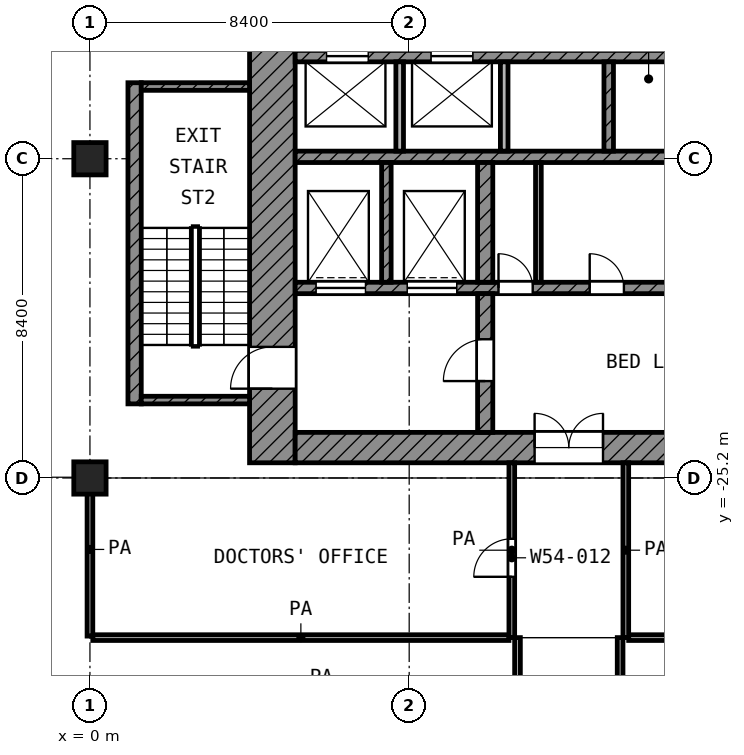
"""IFC4 building model, lengths in metres.
Left out: names, types, materials, properties, quantities, classifications, styles, units other than length and angle.
Written with IfcOpenShell. Run it as: python <this file> out.ifc"""

import sys

from ifc_helpers import new_model, si_unit, direction, frame, frame_2d, origin, origin_2d, place, context, subcontext, project, spatial, rectangle, extrude, element, fill, save


model = new_model("IFC4")
c1 = context("Model", 3, precision=1e-05, world=origin(), true_north=direction((0.0, 1.0)))
c2 = subcontext(c1, "Body", "Model", "MODEL_VIEW")
j1 = project(units=[si_unit("LENGTHUNIT", "METRE"), si_unit("PLANEANGLEUNIT", "RADIAN")], contexts=[c1])
p1 = place(None, origin())
s1 = spatial("IfcSite", under=j1, at=p1, CompositionType="ELEMENT")
p2 = place(p1, origin())
s2 = spatial("IfcBuilding", under=s1, at=p2, CompositionType="ELEMENT")
p3 = place(p2, frame((0.0, 0.0, 255.8)))
s3 = spatial("IfcBuildingStorey", under=s2, at=p3, CompositionType="ELEMENT", Elevation=255.8)
for number, where, z_axis, x_axis in (
    (1, (0.0, -16.8, 0.0), (0.0, 0.0, 1.0), (1.0, 0.0, 0.0)),
    (2, (0.0, -25.2, 0.0), (0.0, 0.0, 1.0), (1.0, 0.0, 0.0)),
):
    element("IfcColumn", number, at=place(p3, frame(where, z_axis=z_axis, x_axis=x_axis)), inside=s3, PredefinedType="COLUMN", context=c2, shape_type="SweptSolid", body=[
        extrude(rectangle(XDim=0.85, YDim=0.85, at=origin_2d()), origin(), (0.0, 0.0, 1.0), 4.2),
    ])
p4 = place(p3, frame((4.8, -24.8, 0.0), z_axis=(0.0, 0.0, 1.0), x_axis=(0.0, 1.0, 0.0)))
e3 = element("IfcWall", 3, at=p4, inside=s3, PredefinedType="SHEAR", context=c2, shape_type="SweptSolid", body=[
    extrude(rectangle(XDim=19.4, YDim=1.2, at=frame_2d((9.7, 0.0))), origin(), (0.0, 0.0, 1.0), 3.6),
])
p5 = place(p4, frame((11.25, 0.0, 0.0)))
e4 = element("IfcOpeningElement", 4, at=p5, cuts=e3, PredefinedType="OPENING", context=c2, shape_type="SweptSolid", body=[
    extrude(rectangle(XDim=1.1, YDim=2.1, at=frame_2d((0.55, 1.05))), frame((0.0, 0.61, 0.0), z_axis=(0.0, -1.0, 0.0), x_axis=(1.0, 0.0, 0.0)), (0.0, 0.0, 1.0), 1.22),
])
p6 = place(p4, frame((1.95, 0.0, 0.0)))
e5 = element("IfcOpeningElement", 5, at=p6, cuts=e3, PredefinedType="OPENING", context=c2, shape_type="SweptSolid", body=[
    extrude(rectangle(XDim=1.1, YDim=2.1, at=frame_2d((0.55, 1.05))), frame((0.0, 0.61, 0.0), z_axis=(0.0, -1.0, 0.0), x_axis=(1.0, 0.0, 0.0)), (0.0, 0.0, 1.0), 1.22),
])
p7 = place(p3, frame((5.4, -24.4, 0.0), z_axis=(0.0, 0.0, 1.0), x_axis=(1.0, 0.0, 0.0)))
e6 = element("IfcWall", 6, at=p7, inside=s3, PredefinedType="SHEAR", context=c2, shape_type="SweptSolid", body=[
    extrude(rectangle(XDim=18.6, YDim=0.8, at=frame_2d((9.3, 0.0))), origin(), (0.0, 0.0, 1.0), 3.6),
])
p8 = place(p7, frame((6.3, 0.0, 0.0)))
e7 = element("IfcOpeningElement", 7, at=p8, cuts=e6, PredefinedType="OPENING", context=c2, shape_type="SweptSolid", body=[
    extrude(rectangle(XDim=1.8, YDim=2.1, at=frame_2d((0.9, 1.05))), frame((0.0, 0.41, 0.0), z_axis=(0.0, -1.0, 0.0), x_axis=(1.0, 0.0, 0.0)), (0.0, 0.0, 1.0), 0.82),
])
p9 = place(p3, frame((5.4, -14.1, 0.0), z_axis=(0.0, 0.0, 1.0), x_axis=(1.0, 0.0, 0.0)))
e8 = element("IfcWall", 8, at=p9, inside=s3, PredefinedType="SHEAR", context=c2, shape_type="SweptSolid", body=[
    extrude(rectangle(XDim=16.65, YDim=0.3, at=frame_2d((8.325, 0.0))), origin(), (0.0, 0.0, 1.0), 3.6),
])
p10 = place(p9, frame((0.825, 0.0, 0.0)))
e9 = element("IfcOpeningElement", 9, at=p10, cuts=e8, PredefinedType="OPENING", context=c2, shape_type="SweptSolid", body=[
    extrude(rectangle(XDim=1.1, YDim=2.1, at=frame_2d((0.55, 1.05))), frame((0.0, 0.16, 0.0), z_axis=(0.0, -1.0, 0.0), x_axis=(1.0, 0.0, 0.0)), (0.0, 0.0, 1.0), 0.32),
])
p11 = place(p9, frame((3.575, 0.0, 0.0)))
e10 = element("IfcOpeningElement", 10, at=p11, cuts=e8, PredefinedType="OPENING", context=c2, shape_type="SweptSolid", body=[
    extrude(rectangle(XDim=1.1, YDim=2.1, at=frame_2d((0.55, 1.05))), frame((0.0, 0.16, 0.0), z_axis=(0.0, -1.0, 0.0), x_axis=(1.0, 0.0, 0.0)), (0.0, 0.0, 1.0), 0.32),
])
p12 = place(p3, frame((5.4, -16.75, 0.0), z_axis=(0.0, 0.0, 1.0), x_axis=(1.0, 0.0, 0.0)))
e11 = element("IfcWall", 11, at=p12, inside=s3, PredefinedType="SHEAR", context=c2, shape_type="SweptSolid", body=[
    extrude(rectangle(XDim=16.65, YDim=0.3, at=frame_2d((8.325, 0.0))), origin(), (0.0, 0.0, 1.0), 3.6),
])
p13 = place(p3, frame((5.4, -20.2, 0.0), z_axis=(0.0, 0.0, 1.0), x_axis=(1.0, 0.0, 0.0)))
e12 = element("IfcWall", 12, at=p13, inside=s3, PredefinedType="SHEAR", context=c2, shape_type="SweptSolid", body=[
    extrude(rectangle(XDim=14.65, YDim=0.3, at=frame_2d((7.325, 0.0))), origin(), (0.0, 0.0, 1.0), 3.6),
])
p14 = place(p13, frame((10.55, 0.0, 0.0)))
e13 = element("IfcOpeningElement", 13, at=p14, cuts=e12, PredefinedType="OPENING", context=c2, shape_type="SweptSolid", body=[
    extrude(rectangle(XDim=1.3, YDim=2.1, at=frame_2d((0.65, 1.05))), frame((0.0, 0.16, 0.0), z_axis=(0.0, -1.0, 0.0), x_axis=(1.0, 0.0, 0.0)), (0.0, 0.0, 1.0), 0.32),
])
p15 = place(p13, frame((12.95, 0.0, 0.0)))
e14 = element("IfcOpeningElement", 14, at=p15, cuts=e12, PredefinedType="OPENING", context=c2, shape_type="SweptSolid", body=[
    extrude(rectangle(XDim=1.3, YDim=2.1, at=frame_2d((0.65, 1.05))), frame((0.0, 0.16, 0.0), z_axis=(0.0, -1.0, 0.0), x_axis=(1.0, 0.0, 0.0)), (0.0, 0.0, 1.0), 0.32),
])
p16 = place(p13, frame((0.55, 0.0, 0.0)))
e15 = element("IfcOpeningElement", 15, at=p16, cuts=e12, PredefinedType="OPENING", context=c2, shape_type="SweptSolid", body=[
    extrude(rectangle(XDim=1.3, YDim=2.1, at=frame_2d((0.65, 1.05))), frame((0.0, 0.16, 0.0), z_axis=(0.0, -1.0, 0.0), x_axis=(1.0, 0.0, 0.0)), (0.0, 0.0, 1.0), 0.32),
])
p17 = place(p13, frame((2.95, 0.0, 0.0)))
e16 = element("IfcOpeningElement", 16, at=p17, cuts=e12, PredefinedType="OPENING", context=c2, shape_type="SweptSolid", body=[
    extrude(rectangle(XDim=1.3, YDim=2.1, at=frame_2d((0.65, 1.05))), frame((0.0, 0.16, 0.0), z_axis=(0.0, -1.0, 0.0), x_axis=(1.0, 0.0, 0.0)), (0.0, 0.0, 1.0), 0.32),
])
p18 = place(p13, frame((5.35, 0.0, 0.0)))
e17 = element("IfcOpeningElement", 17, at=p18, cuts=e12, PredefinedType="OPENING", context=c2, shape_type="SweptSolid", body=[
    extrude(rectangle(XDim=0.9, YDim=2.1, at=frame_2d((0.45, 1.05))), frame((0.0, 0.16, 0.0), z_axis=(0.0, -1.0, 0.0), x_axis=(1.0, 0.0, 0.0)), (0.0, 0.0, 1.0), 0.32),
])
p19 = place(p13, frame((7.75, 0.0, 0.0)))
e18 = element("IfcOpeningElement", 18, at=p19, cuts=e12, PredefinedType="OPENING", context=c2, shape_type="SweptSolid", body=[
    extrude(rectangle(XDim=0.9, YDim=2.1, at=frame_2d((0.45, 1.05))), frame((0.0, 0.16, 0.0), z_axis=(0.0, -1.0, 0.0), x_axis=(1.0, 0.0, 0.0)), (0.0, 0.0, 1.0), 0.32),
])
p20 = place(p3, frame((10.4, -24.0, 0.0), z_axis=(0.0, 0.0, 1.0), x_axis=(0.0, 1.0, 0.0)))
e19 = element("IfcWall", 19, at=p20, inside=s3, PredefinedType="SHEAR", context=c2, shape_type="SweptSolid", body=[
    extrude(rectangle(XDim=3.65, YDim=0.4, at=frame_2d((1.825, 0.0))), origin(), (0.0, 0.0, 1.0), 3.6),
])
p21 = place(p20, frame((1.35, 0.0, 0.0)))
e20 = element("IfcOpeningElement", 20, at=p21, cuts=e19, PredefinedType="OPENING", context=c2, shape_type="SweptSolid", body=[
    extrude(rectangle(XDim=1.1, YDim=2.1, at=frame_2d((0.55, 1.05))), frame((0.0, 0.21, 0.0), z_axis=(0.0, -1.0, 0.0), x_axis=(1.0, 0.0, 0.0)), (0.0, 0.0, 1.0), 0.42),
])
p22 = place(p3, frame((10.4, -20.05, 0.0), z_axis=(0.0, 0.0, 1.0), x_axis=(0.0, 1.0, 0.0)))
e21 = element("IfcWall", 21, at=p22, inside=s3, PredefinedType="SHEAR", context=c2, shape_type="SweptSolid", body=[
    extrude(rectangle(XDim=3.15, YDim=0.4, at=frame_2d((1.575, 0.0))), origin(), (0.0, 0.0, 1.0), 3.6),
])
p23 = place(p3, frame((7.8, -20.05, 0.0), z_axis=(0.0, 0.0, 1.0), x_axis=(0.0, 1.0, 0.0)))
e22 = element("IfcWall", 22, at=p23, inside=s3, PredefinedType="SHEAR", context=c2, shape_type="SweptSolid", body=[
    extrude(rectangle(XDim=3.15, YDim=0.25, at=frame_2d((1.575, 0.0))), origin(), (0.0, 0.0, 1.0), 3.6),
])
for number, where, z_axis, x_axis in (
    (23, (8.15, -16.6, 0.0), (0.0, 0.0, 1.0), (0.0, 1.0, 0.0)),
    (24, (10.9, -16.6, 0.0), (0.0, 0.0, 1.0), (0.0, 1.0, 0.0)),
):
    element("IfcWall", number, at=place(p3, frame(where, z_axis=z_axis, x_axis=x_axis)), inside=s3, PredefinedType="PARTITIONING", context=c2, shape_type="SweptSolid", body=[
        extrude(rectangle(XDim=2.35, YDim=0.2, at=frame_2d((1.175, 0.0))), origin(), (0.0, 0.0, 1.0), 3.6),
    ])
p24 = place(p3, frame((13.65, -16.6, 0.0), z_axis=(0.0, 0.0, 1.0), x_axis=(0.0, 1.0, 0.0)))
e25 = element("IfcWall", 25, at=p24, inside=s3, PredefinedType="SHEAR", context=c2, shape_type="SweptSolid", body=[
    extrude(rectangle(XDim=2.35, YDim=0.25, at=frame_2d((1.175, 0.0))), origin(), (0.0, 0.0, 1.0), 3.6),
])
p25 = place(p3, frame((11.8, -20.05, 0.0), z_axis=(0.0, 0.0, 1.0), x_axis=(0.0, 1.0, 0.0)))
e26 = element("IfcWall", 26, at=p25, inside=s3, PredefinedType="PARTITIONING", context=c2, shape_type="SweptSolid", body=[
    extrude(rectangle(XDim=3.15, YDim=0.15, at=frame_2d((1.575, 0.0))), origin(), (0.0, 0.0, 1.0), 3.6),
])
p26 = place(p3, frame((1.175, -23.25, 0.0), z_axis=(0.0, 0.0, 1.0), x_axis=(0.0, 1.0, 0.0)))
e27 = element("IfcWall", 27, at=p26, inside=s3, PredefinedType="SHEAR", context=c2, shape_type="SweptSolid", body=[
    extrude(rectangle(XDim=8.45, YDim=0.35, at=frame_2d((4.225, 0.0))), origin(), (0.0, 0.0, 1.0), 3.6),
])
for number, where, z_axis, x_axis in (
    (28, (1.35, -14.9, 0.0), (0.0, 0.0, 1.0), (1.0, 0.0, 0.0)),
    (29, (1.35, -23.15, 0.0), (0.0, 0.0, 1.0), (1.0, 0.0, 0.0)),
):
    element("IfcWall", number, at=place(p3, frame(where, z_axis=z_axis, x_axis=x_axis)), inside=s3, PredefinedType="SHEAR", context=c2, shape_type="SweptSolid", body=[
        extrude(rectangle(XDim=2.85, YDim=0.2, at=frame_2d((1.425, 0.0))), origin(), (0.0, 0.0, 1.0), 3.6),
    ])
for number, where, z_axis, x_axis in (
    (30, (0.075, -29.4, 0.0), (0.0, 0.0, 1.0), (1.0, 0.0, 0.0)),
    (31, (14.175, -29.4, 0.0), (0.0, 0.0, 1.0), (1.0, 0.0, 0.0)),
):
    element("IfcWall", number, at=place(p3, frame(where, z_axis=z_axis, x_axis=x_axis)), inside=s3, PredefinedType="PARTITIONING", context=c2, shape_type="SweptSolid", body=[
        extrude(rectangle(XDim=10.95, YDim=0.15, at=frame_2d((5.475, 0.0))), origin(), (0.0, 0.0, 1.0), 3.6),
    ])
p27 = place(p3, frame((0.0, -29.36, 0.0), z_axis=(0.0, 0.0, 1.0), x_axis=(0.0, 1.0, 0.0)))
e32 = element("IfcWall", 32, at=p27, inside=s3, PredefinedType="PARTITIONING", context=c2, shape_type="SweptSolid", body=[
    extrude(rectangle(XDim=4.56, YDim=0.15, at=frame_2d((2.28, 0.0))), origin(), (0.0, 0.0, 1.0), 3.6),
])
p28 = place(p3, frame((11.1, -29.4, 0.0), z_axis=(0.0, 0.0, 1.0), x_axis=(0.0, 1.0, 0.0)))
e33 = element("IfcWall", 33, at=p28, inside=s3, PredefinedType="PARTITIONING", context=c2, shape_type="SweptSolid", body=[
    extrude(rectangle(XDim=4.6, YDim=0.15, at=frame_2d((2.3, 0.0))), origin(), (0.0, 0.0, 1.0), 3.6),
])
p29 = place(p28, frame((1.6, 0.0, 0.0)))
e34 = element("IfcOpeningElement", 34, at=p29, cuts=e33, PredefinedType="OPENING", context=c2, shape_type="SweptSolid", body=[
    extrude(rectangle(XDim=1.0, YDim=2.1, at=frame_2d((0.5, 1.05))), frame((0.0, 0.085, 0.0), z_axis=(0.0, -1.0, 0.0), x_axis=(1.0, 0.0, 0.0)), (0.0, 0.0, 1.0), 0.17),
])
p30 = place(p3, frame((11.25, -31.907, 0.0), z_axis=(0.0, 0.0, 1.0), x_axis=(0.0, 1.0, 0.0)))
e35 = element("IfcWall", 35, at=p30, inside=s3, PredefinedType="PARTITIONING", context=c2, shape_type="SweptSolid", body=[
    extrude(rectangle(XDim=2.507, YDim=0.15, at=frame_2d((1.253, 0.0))), origin(), (0.0, 0.0, 1.0), 3.6),
])
p31 = place(p3, frame((13.95, -46.12, 0.0), z_axis=(0.0, 0.0, 1.0), x_axis=(0.0, 1.0, 0.0)))
e36 = element("IfcWall", 36, at=p31, inside=s3, PredefinedType="PARTITIONING", context=c2, shape_type="SweptSolid", body=[
    extrude(rectangle(XDim=16.72, YDim=0.15, at=frame_2d((8.36, 0.0))), origin(), (0.0, 0.0, 1.0), 3.6),
])
p32 = place(p31, frame((14.12, 0.0, 0.0)))
e37 = element("IfcOpeningElement", 37, at=p32, cuts=e36, PredefinedType="OPENING", context=c2, shape_type="SweptSolid", body=[
    extrude(rectangle(XDim=1.0, YDim=2.1, at=frame_2d((0.5, 1.05))), frame((0.0, 0.085, 0.0), z_axis=(0.0, -1.0, 0.0), x_axis=(1.0, 0.0, 0.0)), (0.0, 0.0, 1.0), 0.17),
])
p33 = place(p31, frame((9.82, 0.0, 0.0)))
e38 = element("IfcOpeningElement", 38, at=p33, cuts=e36, PredefinedType="OPENING", context=c2, shape_type="SweptSolid", body=[
    extrude(rectangle(XDim=1.2, YDim=2.1, at=frame_2d((0.6, 1.05))), frame((0.0, 0.085, 0.0), z_axis=(0.0, -1.0, 0.0), x_axis=(1.0, 0.0, 0.0)), (0.0, 0.0, 1.0), 0.17),
])
p34 = place(p31, frame((5.72, 0.0, 0.0)))
e39 = element("IfcOpeningElement", 39, at=p34, cuts=e36, PredefinedType="OPENING", context=c2, shape_type="SweptSolid", body=[
    extrude(rectangle(XDim=1.0, YDim=2.1, at=frame_2d((0.5, 1.05))), frame((0.0, 0.085, 0.0), z_axis=(0.0, -1.0, 0.0), x_axis=(1.0, 0.0, 0.0)), (0.0, 0.0, 1.0), 0.17),
])
p35 = place(p31, frame((1.52, 0.0, 0.0)))
e40 = element("IfcOpeningElement", 40, at=p35, cuts=e36, PredefinedType="OPENING", context=c2, shape_type="SweptSolid", body=[
    extrude(rectangle(XDim=1.0, YDim=2.1, at=frame_2d((0.5, 1.05))), frame((0.0, 0.085, 0.0), z_axis=(0.0, -1.0, 0.0), x_axis=(1.0, 0.0, 0.0)), (0.0, 0.0, 1.0), 0.17),
])
p36 = place(p3, frame((14.1, -29.4, 0.0), z_axis=(0.0, 0.0, 1.0), x_axis=(0.0, 1.0, 0.0)))
e41 = element("IfcWall", 41, at=p36, inside=s3, PredefinedType="PARTITIONING", context=c2, shape_type="SweptSolid", body=[
    extrude(rectangle(XDim=4.6, YDim=0.15, at=frame_2d((2.3, 0.0))), origin(), (0.0, 0.0, 1.0), 3.6),
])
p37 = place(p10, origin())
e42 = element("IfcDoor", 42, at=p37, inside=s3, OperationType="DOUBLE_DOOR_SLIDING", PredefinedType="DOOR", context=c2, shape_type="SweptSolid", body=[
    extrude(rectangle(XDim=1.1, YDim=2.1, at=frame_2d((0.55, 1.05))), frame((0.0, 0.025, 0.0), z_axis=(0.0, -1.0, 0.0), x_axis=(1.0, 0.0, 0.0)), (0.0, 0.0, 1.0), 0.05),
])
fill(e9, e42)
p38 = place(p11, origin())
e43 = element("IfcDoor", 43, at=p38, inside=s3, OperationType="DOUBLE_DOOR_SLIDING", PredefinedType="DOOR", context=c2, shape_type="SweptSolid", body=[
    extrude(rectangle(XDim=1.1, YDim=2.1, at=frame_2d((0.55, 1.05))), frame((0.0, 0.025, 0.0), z_axis=(0.0, -1.0, 0.0), x_axis=(1.0, 0.0, 0.0)), (0.0, 0.0, 1.0), 0.05),
])
fill(e10, e43)
p39 = place(p16, origin())
e44 = element("IfcDoor", 44, at=p39, inside=s3, OperationType="DOUBLE_DOOR_SLIDING", PredefinedType="DOOR", context=c2, shape_type="SweptSolid", body=[
    extrude(rectangle(XDim=1.3, YDim=2.1, at=frame_2d((0.65, 1.05))), frame((0.0, 0.025, 0.0), z_axis=(0.0, -1.0, 0.0), x_axis=(1.0, 0.0, 0.0)), (0.0, 0.0, 1.0), 0.05),
])
fill(e15, e44)
p40 = place(p17, origin())
e45 = element("IfcDoor", 45, at=p40, inside=s3, OperationType="DOUBLE_DOOR_SLIDING", PredefinedType="DOOR", context=c2, shape_type="SweptSolid", body=[
    extrude(rectangle(XDim=1.3, YDim=2.1, at=frame_2d((0.65, 1.05))), frame((0.0, 0.025, 0.0), z_axis=(0.0, -1.0, 0.0), x_axis=(1.0, 0.0, 0.0)), (0.0, 0.0, 1.0), 0.05),
])
fill(e16, e45)
p41 = place(p6, origin())
e46 = element("IfcDoor", 46, at=p41, inside=s3, OperationType="SINGLE_SWING_LEFT", PredefinedType="DOOR", context=c2, shape_type="SweptSolid", body=[
    extrude(rectangle(XDim=1.1, YDim=2.1, at=frame_2d((0.55, 1.05))), frame((0.0, 0.025, 0.0), z_axis=(0.0, -1.0, 0.0), x_axis=(1.0, 0.0, 0.0)), (0.0, 0.0, 1.0), 0.05),
])
fill(e5, e46)
p42 = place(p21, origin())
e47 = element("IfcDoor", 47, at=p42, inside=s3, OperationType="SINGLE_SWING_LEFT", PredefinedType="DOOR", context=c2, shape_type="SweptSolid", body=[
    extrude(rectangle(XDim=1.1, YDim=2.1, at=frame_2d((0.55, 1.05))), frame((0.0, 0.025, 0.0), z_axis=(0.0, -1.0, 0.0), x_axis=(1.0, 0.0, 0.0)), (0.0, 0.0, 1.0), 0.05),
])
fill(e20, e47)
p43 = place(p8, origin())
e48 = element("IfcDoor", 48, at=p43, inside=s3, OperationType="DOUBLE_DOOR_SINGLE_SWING", PredefinedType="DOOR", context=c2, shape_type="SweptSolid", body=[
    extrude(rectangle(XDim=1.8, YDim=2.1, at=frame_2d((0.9, 1.05))), frame((0.0, 0.025, 0.0), z_axis=(0.0, -1.0, 0.0), x_axis=(1.0, 0.0, 0.0)), (0.0, 0.0, 1.0), 0.05),
])
fill(e7, e48)
p44 = place(p18, origin())
e49 = element("IfcDoor", 49, at=p44, inside=s3, OperationType="SINGLE_SWING_LEFT", PredefinedType="DOOR", context=c2, shape_type="SweptSolid", body=[
    extrude(rectangle(XDim=0.9, YDim=2.1, at=frame_2d((0.45, 1.05))), frame((0.0, 0.025, 0.0), z_axis=(0.0, -1.0, 0.0), x_axis=(1.0, 0.0, 0.0)), (0.0, 0.0, 1.0), 0.05),
])
fill(e17, e49)
p45 = place(p19, origin())
e50 = element("IfcDoor", 50, at=p45, inside=s3, OperationType="SINGLE_SWING_LEFT", PredefinedType="DOOR", context=c2, shape_type="SweptSolid", body=[
    extrude(rectangle(XDim=0.9, YDim=2.1, at=frame_2d((0.45, 1.05))), frame((0.0, 0.025, 0.0), z_axis=(0.0, -1.0, 0.0), x_axis=(1.0, 0.0, 0.0)), (0.0, 0.0, 1.0), 0.05),
])
fill(e18, e50)
p46 = place(p29, origin())
e51 = element("IfcDoor", 51, at=p46, inside=s3, OperationType="SINGLE_SWING_LEFT", PredefinedType="DOOR", context=c2, shape_type="SweptSolid", body=[
    extrude(rectangle(XDim=1.0, YDim=2.1, at=frame_2d((0.5, 1.05))), frame((0.0, 0.025, 0.0), z_axis=(0.0, -1.0, 0.0), x_axis=(1.0, 0.0, 0.0)), (0.0, 0.0, 1.0), 0.05),
])
fill(e34, e51)
save(model, sys.argv[1])
